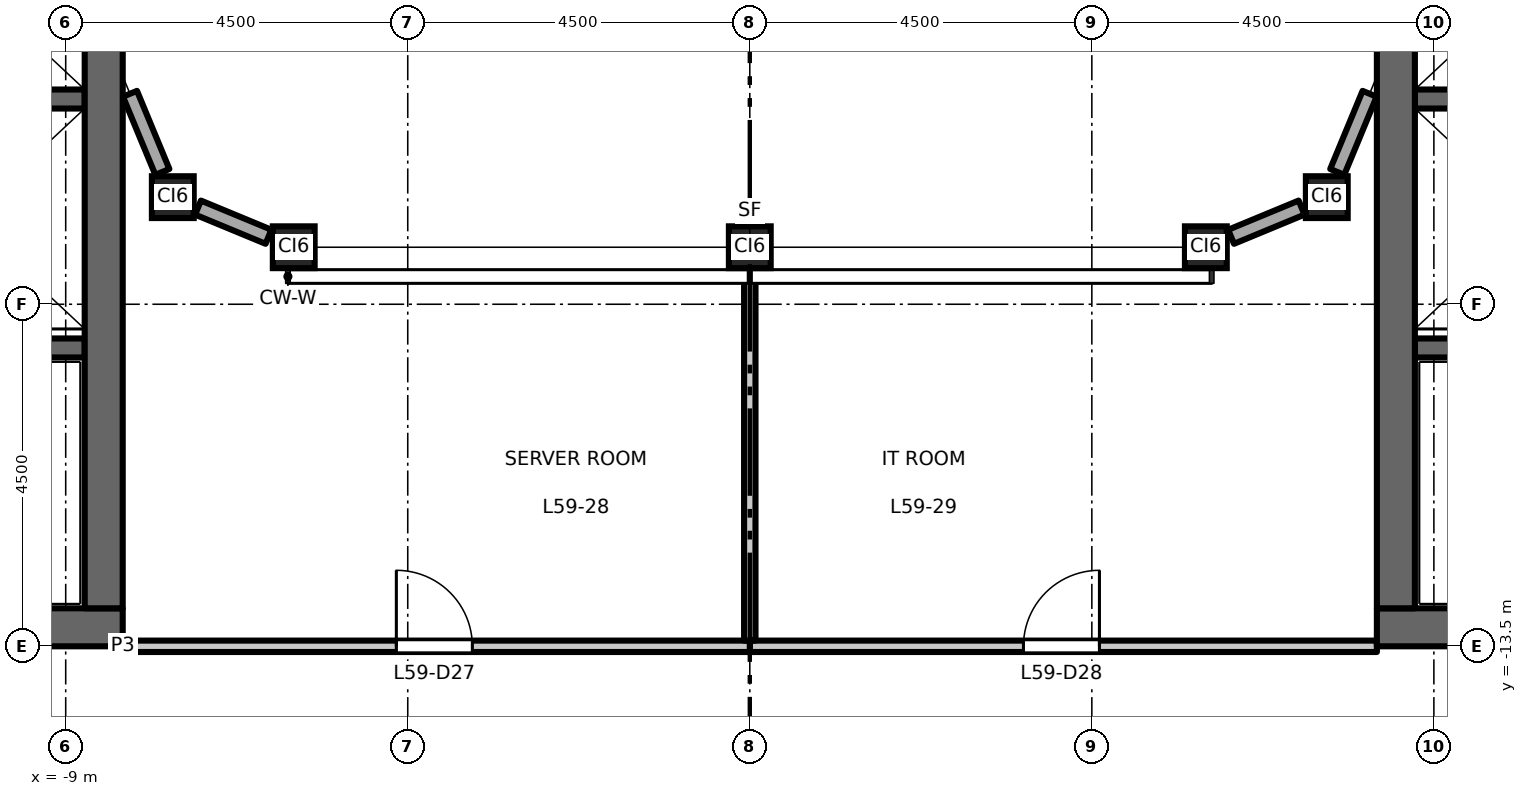
"""IFC4 building model, lengths in metres.
Left out: names, types, materials, properties, quantities, classifications, styles, units other than length and angle.
Written with IfcOpenShell. Run it as: python <this file> out.ifc"""

import sys

from ifc_helpers import new_model, si_unit, direction, frame, frame_2d, origin, origin_2d, place, context, subcontext, project, spatial, rectangle, hollow_rectangle, extrude, element, fill, save


model = new_model("IFC4")
c1 = context("Model", 3, precision=1e-05, world=origin(), true_north=direction((0.0, 1.0)))
c2 = subcontext(c1, "Body", "Model", "MODEL_VIEW")
j1 = project(units=[si_unit("LENGTHUNIT", "METRE"), si_unit("PLANEANGLEUNIT", "RADIAN")], contexts=[c1])
p1 = place(None, origin())
s1 = spatial("IfcSite", under=j1, at=p1, CompositionType="ELEMENT")
p2 = place(p1, origin())
s2 = spatial("IfcBuilding", under=s1, at=p2, CompositionType="ELEMENT")
p3 = place(p2, frame((0.0, 0.0, 273.7)))
s3 = spatial("IfcBuildingStorey", under=s2, at=p3, CompositionType="ELEMENT", Elevation=273.7)
for number, where, z_axis, x_axis in (
    (1, (-7.591, -7.591, 0.0), (0.0, 0.0, 1.0), (1.0, 0.0, 0.0)),
    (2, (-6.0, -8.25, 0.0), (0.0, 0.0, 1.0), (1.0, 0.0, 0.0)),
    (3, (0.0, -8.25, 0.0), (0.0, 0.0, 1.0), (1.0, 0.0, 0.0)),
    (4, (6.0, -8.25, 0.0), (0.0, 0.0, 1.0), (1.0, 0.0, 0.0)),
    (5, (7.591, -7.591, 0.0), (0.0, 0.0, 1.0), (1.0, 0.0, 0.0)),
):
    element("IfcColumn", number, at=place(p3, frame(where, z_axis=z_axis, x_axis=x_axis)), inside=s3, PredefinedType="COLUMN", context=c2, shape_type="SweptSolid", body=[
        extrude(hollow_rectangle(XDim=0.55, YDim=0.55, WallThickness=0.028, at=origin_2d()), origin(), (0.0, 0.0, 1.0), 4.5),
    ])
p4 = place(p3, frame((-8.75, -6.3, 0.0), z_axis=(0.0, 0.0, 1.0), x_axis=(-1.0, 0.0, 0.0)))
e6 = element("IfcWall", 6, at=p4, inside=s3, PredefinedType="SHEAR", context=c2, shape_type="SweptSolid", body=[
    extrude(rectangle(XDim=3.1, YDim=0.25, at=frame_2d((1.55, 0.0))), origin(), (0.0, 0.0, 1.0), 4.3),
])
p5 = place(p3, frame((-8.75, -9.575, 0.0), z_axis=(0.0, 0.0, 1.0), x_axis=(-1.0, 0.0, 0.0)))
e7 = element("IfcWall", 7, at=p5, inside=s3, PredefinedType="SHEAR", context=c2, shape_type="SweptSolid", body=[
    extrude(rectangle(XDim=8.0, YDim=0.25, at=frame_2d((4.0, 0.0))), origin(), (0.0, 0.0, 1.0), 4.3),
])
p6 = place(p5, frame((6.65, 0.0, 0.0)))
e8 = element("IfcOpeningElement", 8, at=p6, cuts=e7, PredefinedType="OPENING", context=c2, shape_type="SweptSolid", body=[
    extrude(rectangle(XDim=1.1, YDim=2.1, at=frame_2d((0.55, 1.05))), frame((0.0, 0.135, 0.0), z_axis=(0.0, -1.0, 0.0), x_axis=(1.0, 0.0, 0.0)), (0.0, 0.0, 1.0), 0.27),
])
p7 = place(p3, frame((-8.25, -13.25, 0.0), z_axis=(0.0, 0.0, 1.0), x_axis=(-1.0, 0.0, 0.0)))
e9 = element("IfcWall", 9, at=p7, inside=s3, PredefinedType="SHEAR", context=c2, shape_type="SweptSolid", body=[
    extrude(rectangle(XDim=13.5, YDim=0.5, at=frame_2d((6.75, 0.0))), origin(), (0.0, 0.0, 1.0), 4.3),
])
p8 = place(p3, frame((-8.5, -13.0, 0.0), z_axis=(0.0, 0.0, 1.0), x_axis=(0.0, 1.0, 0.0)))
e10 = element("IfcWall", 10, at=p8, inside=s3, PredefinedType="SHEAR", context=c2, shape_type="SweptSolid", body=[
    extrude(rectangle(XDim=26.0, YDim=0.5, at=frame_2d((13.0, 0.0))), origin(), (0.0, 0.0, 1.0), 4.3),
])
p9 = place(p3, frame((8.75, -6.3, 0.0), z_axis=(0.0, 0.0, 1.0), x_axis=(1.0, 0.0, 0.0)))
e11 = element("IfcWall", 11, at=p9, inside=s3, PredefinedType="SHEAR", context=c2, shape_type="SweptSolid", body=[
    extrude(rectangle(XDim=3.1, YDim=0.25, at=frame_2d((1.55, 0.0))), origin(), (0.0, 0.0, 1.0), 4.3),
])
p10 = place(p3, frame((8.75, -9.575, 0.0), z_axis=(0.0, 0.0, 1.0), x_axis=(1.0, 0.0, 0.0)))
e12 = element("IfcWall", 12, at=p10, inside=s3, PredefinedType="SHEAR", context=c2, shape_type="SweptSolid", body=[
    extrude(rectangle(XDim=8.0, YDim=0.25, at=frame_2d((4.0, 0.0))), origin(), (0.0, 0.0, 1.0), 4.3),
])
p11 = place(p10, frame((6.65, 0.0, 0.0)))
e13 = element("IfcOpeningElement", 13, at=p11, cuts=e12, PredefinedType="OPENING", context=c2, shape_type="SweptSolid", body=[
    extrude(rectangle(XDim=1.1, YDim=2.1, at=frame_2d((0.55, 1.05))), frame((0.0, 0.135, 0.0), z_axis=(0.0, -1.0, 0.0), x_axis=(1.0, 0.0, 0.0)), (0.0, 0.0, 1.0), 0.27),
])
p12 = place(p3, frame((8.25, -13.25, 0.0), z_axis=(0.0, 0.0, 1.0), x_axis=(1.0, 0.0, 0.0)))
e14 = element("IfcWall", 14, at=p12, inside=s3, PredefinedType="SHEAR", context=c2, shape_type="SweptSolid", body=[
    extrude(rectangle(XDim=13.5, YDim=0.5, at=frame_2d((6.75, 0.0))), origin(), (0.0, 0.0, 1.0), 4.3),
])
p13 = place(p3, frame((8.5, -13.0, 0.0), z_axis=(0.0, 0.0, 1.0), x_axis=(0.0, 1.0, 0.0)))
e15 = element("IfcWall", 15, at=p13, inside=s3, PredefinedType="SHEAR", context=c2, shape_type="SweptSolid", body=[
    extrude(rectangle(XDim=26.0, YDim=0.5, at=frame_2d((13.0, 0.0))), origin(), (0.0, 0.0, 1.0), 4.3),
])
p14 = place(p3, frame((6.332, -8.113, 0.0), z_axis=(0.0, 0.0, 1.0), x_axis=(0.923859650767, 0.382731427616, 0.0)))
e16 = element("IfcWall", 16, at=p14, inside=s3, PredefinedType="STANDARD", context=c2, shape_type="SweptSolid", body=[
    extrude(rectangle(XDim=1.003, YDim=0.2, at=frame_2d((0.502, 0.0))), origin(), (0.0, 0.0, 1.0), 3.868),
])
for number, where, z_axis, x_axis in (
    (17, (7.729, -7.259, 0.0), (0.0, 0.0, 1.0), (0.383, 0.924, 0.0)),
    (18, (-8.154, -6.231, 0.0), (0.0, 0.0, 1.0), (0.383, -0.924, 0.0)),
):
    element("IfcWall", number, at=place(p3, frame(where, z_axis=z_axis, x_axis=x_axis)), inside=s3, PredefinedType="STANDARD", context=c2, shape_type="SweptSolid", body=[
        extrude(rectangle(XDim=1.113, YDim=0.2, at=frame_2d((0.556, 0.0))), origin(), (0.0, 0.0, 1.0), 3.868),
    ])
p15 = place(p3, frame((-7.259, -7.729, 0.0), z_axis=(0.0, 0.0, 1.0), x_axis=(0.923859650767, -0.382731427616, 0.0)))
e19 = element("IfcWall", 19, at=p15, inside=s3, PredefinedType="STANDARD", context=c2, shape_type="SweptSolid", body=[
    extrude(rectangle(XDim=1.003, YDim=0.2, at=frame_2d((0.502, 0.0))), origin(), (0.0, 0.0, 1.0), 3.868),
])
p16 = place(p3, frame((0.0, -13.5, 0.0), z_axis=(0.0, 0.0, 1.0), x_axis=(1.0, 0.0, 0.0)))
e20 = element("IfcWall", 20, at=p16, inside=s3, PredefinedType="PARTITIONING", context=c2, shape_type="SweptSolid", body=[
    extrude(rectangle(XDim=8.25, YDim=0.15, at=frame_2d((4.125, 0.0))), origin(), (0.0, 0.0, 1.0), 3.9),
])
p17 = place(p16, frame((3.6, 0.0, 0.0)))
e21 = element("IfcOpeningElement", 21, at=p17, cuts=e20, PredefinedType="OPENING", context=c2, shape_type="SweptSolid", body=[
    extrude(rectangle(XDim=1.0, YDim=2.1, at=frame_2d((0.5, 1.05))), frame((0.0, 0.085, 0.0), z_axis=(0.0, -1.0, 0.0), x_axis=(1.0, 0.0, 0.0)), (0.0, 0.0, 1.0), 0.17),
])
p18 = place(p3, frame((-8.25, -13.5, 0.0), z_axis=(0.0, 0.0, 1.0), x_axis=(1.0, 0.0, 0.0)))
e22 = element("IfcWall", 22, at=p18, inside=s3, PredefinedType="PARTITIONING", context=c2, shape_type="SweptSolid", body=[
    extrude(rectangle(XDim=8.25, YDim=0.15, at=frame_2d((4.125, 0.0))), origin(), (0.0, 0.0, 1.0), 3.9),
])
p19 = place(p18, frame((3.6, 0.0, 0.0)))
e23 = element("IfcOpeningElement", 23, at=p19, cuts=e22, PredefinedType="OPENING", context=c2, shape_type="SweptSolid", body=[
    extrude(rectangle(XDim=1.0, YDim=2.1, at=frame_2d((0.5, 1.05))), frame((0.0, 0.085, 0.0), z_axis=(0.0, -1.0, 0.0), x_axis=(1.0, 0.0, 0.0)), (0.0, 0.0, 1.0), 0.17),
])
p20 = place(p3, frame((0.0, -13.425, 0.0), z_axis=(0.0, 0.0, 1.0), x_axis=(0.0, 1.0, 0.0)))
e24 = element("IfcWall", 24, at=p20, inside=s3, PredefinedType="PARTITIONING", context=c2, shape_type="SweptSolid", body=[
    extrude(rectangle(XDim=4.825, YDim=0.15, at=frame_2d((2.413, 0.0))), origin(), (0.0, 0.0, 1.0), 3.5),
])
p21 = place(p19, origin())
e25 = element("IfcDoor", 25, at=p21, inside=s3, OperationType="SINGLE_SWING_LEFT", PredefinedType="DOOR", context=c2, shape_type="SweptSolid", body=[
    extrude(rectangle(XDim=1.0, YDim=2.1, at=frame_2d((0.5, 1.05))), frame((0.0, 0.025, 0.0), z_axis=(0.0, -1.0, 0.0), x_axis=(1.0, 0.0, 0.0)), (0.0, 0.0, 1.0), 0.05),
])
fill(e23, e25)
p22 = place(p17, origin())
e26 = element("IfcDoor", 26, at=p22, inside=s3, OperationType="SINGLE_SWING_RIGHT", PredefinedType="DOOR", context=c2, shape_type="SweptSolid", body=[
    extrude(rectangle(XDim=1.0, YDim=2.1, at=frame_2d((0.5, 1.05))), frame((0.0, 0.025, 0.0), z_axis=(0.0, -1.0, 0.0), x_axis=(1.0, 0.0, 0.0)), (0.0, 0.0, 1.0), 0.05),
])
fill(e21, e26)
save(model, sys.argv[1])
